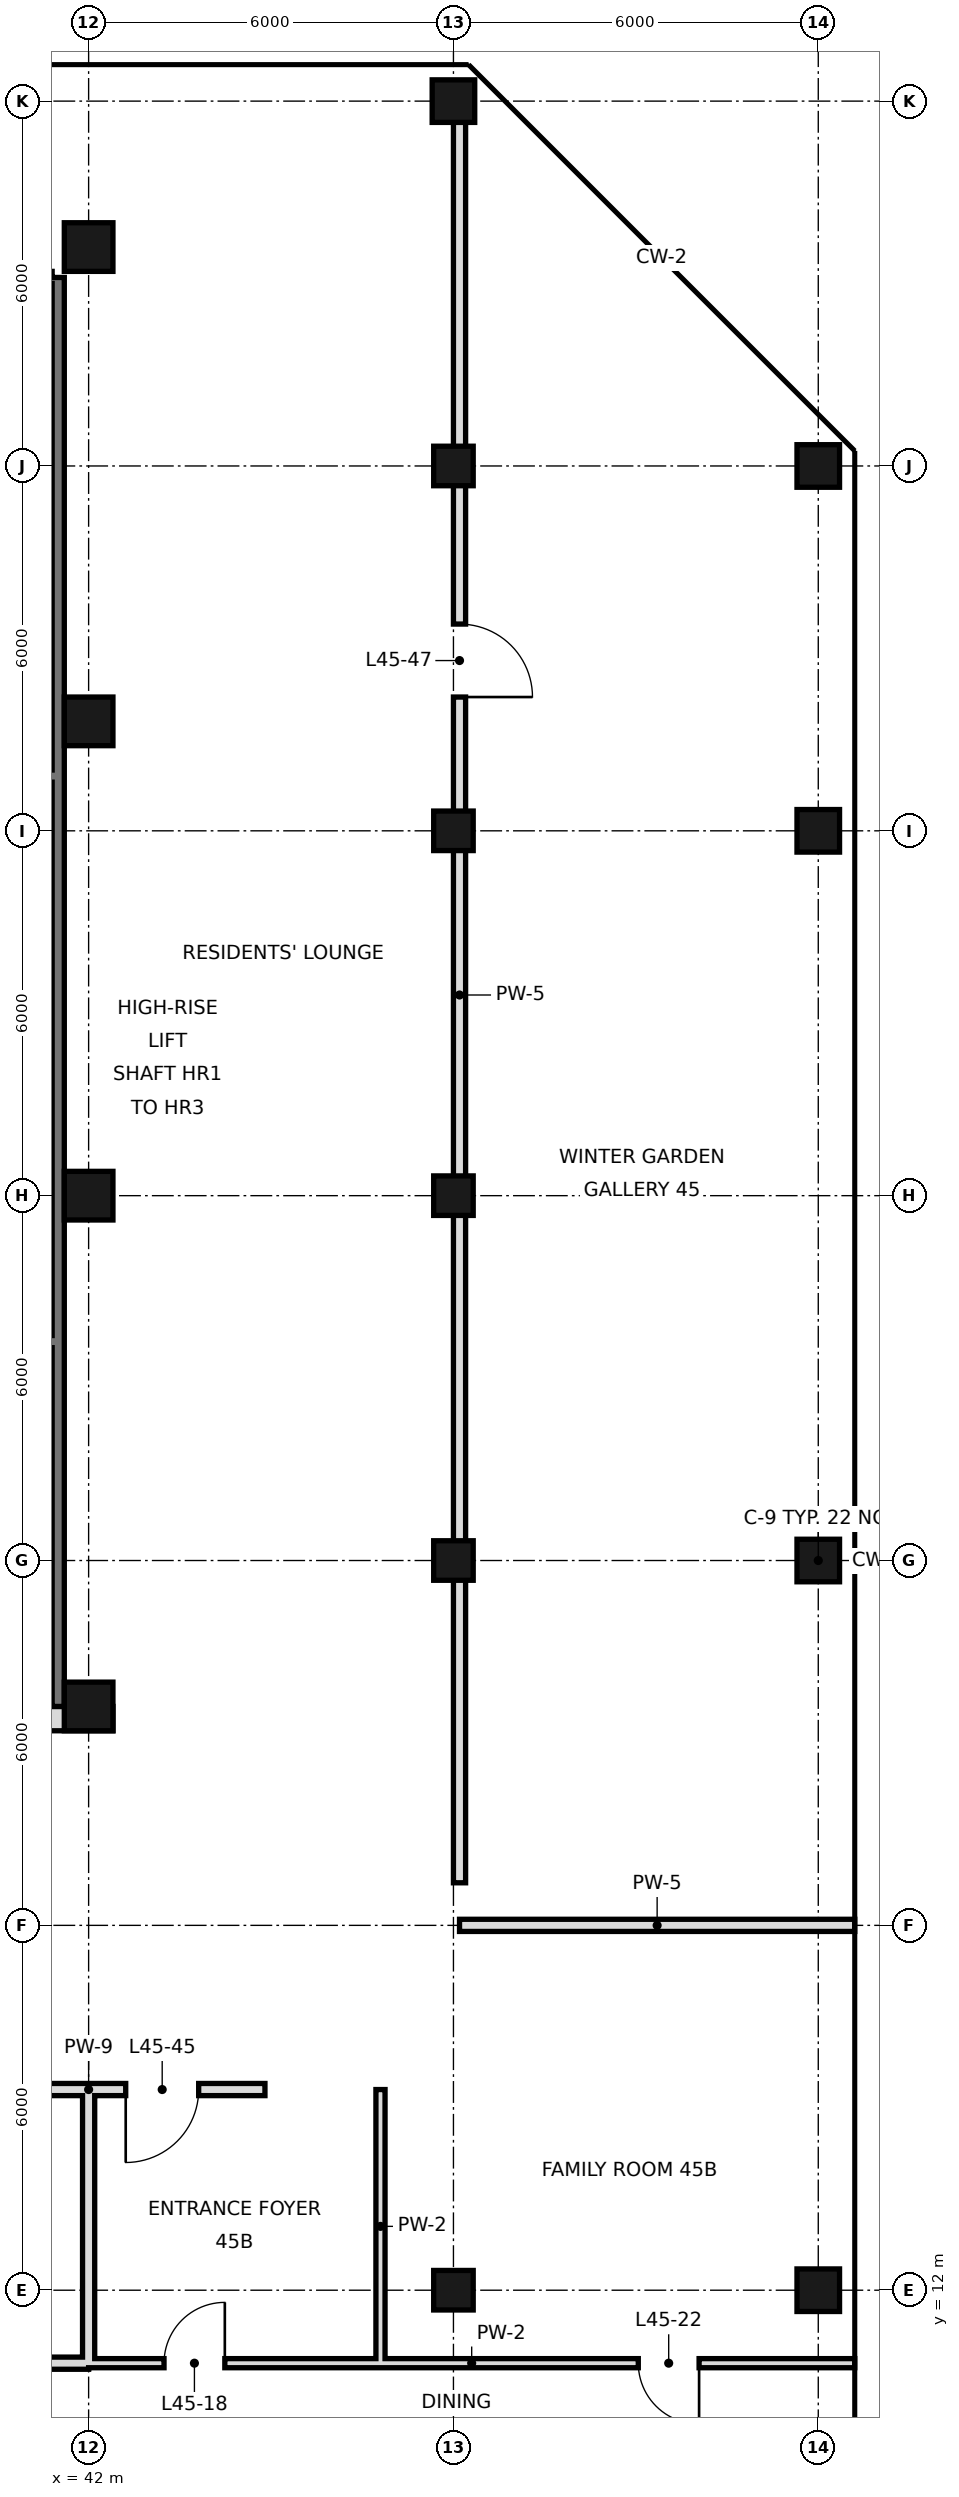
"""IFC4 building model, lengths in metres.
Left out: names, types, materials, properties, quantities, classifications, styles, units other than length and angle.
Written with IfcOpenShell. Run it as: python <this file> out.ifc"""

import sys

from ifc_helpers import new_model, si_unit, direction, frame, frame_2d, origin, origin_2d, place, context, subcontext, project, spatial, rectangle, hollow_rectangle, extrude, element, fill, save


model = new_model("IFC4")
c1 = context("Model", 3, precision=1e-05, world=origin(), true_north=direction((0.0, 1.0)))
c2 = subcontext(c1, "Body", "Model", "MODEL_VIEW")
j1 = project(units=[si_unit("LENGTHUNIT", "METRE"), si_unit("PLANEANGLEUNIT", "RADIAN")], contexts=[c1])
p1 = place(None, origin())
s1 = spatial("IfcSite", under=j1, at=p1, CompositionType="ELEMENT")
p2 = place(p1, origin())
s2 = spatial("IfcBuilding", under=s1, at=p2, CompositionType="ELEMENT")
p3 = place(p2, frame((0.0, 0.0, 195.6)))
s3 = spatial("IfcBuildingStorey", under=s2, at=p3, CompositionType="ELEMENT", Elevation=195.6)
for number, where, z_axis, x_axis in (
    (1, (42.0, 21.6, 0.0), (0.0, 0.0, 1.0), (1.0, 0.0, 0.0)),
    (2, (42.0, 30.0, 0.0), (0.0, 0.0, 1.0), (1.0, 0.0, 0.0)),
    (3, (42.0, 37.8, 0.0), (0.0, 0.0, 1.0), (1.0, 0.0, 0.0)),
    (4, (42.0, 45.6, 0.0), (0.0, 0.0, 1.0), (1.0, 0.0, 0.0)),
):
    element("IfcColumn", number, at=place(p3, frame(where, z_axis=z_axis, x_axis=x_axis)), inside=s3, PredefinedType="COLUMN", context=c2, shape_type="SweptSolid", body=[
        extrude(hollow_rectangle(XDim=0.8, YDim=0.8, WallThickness=0.045, at=origin_2d()), origin(), (0.0, 0.0, 1.0), 3.6),
    ])
for number, where, z_axis, x_axis in (
    (5, (48.0, 12.0, 0.0), (0.0, 0.0, 1.0), (1.0, 0.0, 0.0)),
    (6, (48.0, 24.0, 0.0), (0.0, 0.0, 1.0), (1.0, 0.0, 0.0)),
    (7, (48.0, 30.0, 0.0), (0.0, 0.0, 1.0), (1.0, 0.0, 0.0)),
    (8, (48.0, 36.0, 0.0), (0.0, 0.0, 1.0), (1.0, 0.0, 0.0)),
    (9, (48.0, 42.0, 0.0), (0.0, 0.0, 1.0), (1.0, 0.0, 0.0)),
):
    element("IfcColumn", number, at=place(p3, frame(where, z_axis=z_axis, x_axis=x_axis)), inside=s3, PredefinedType="COLUMN", context=c2, shape_type="SweptSolid", body=[
        extrude(hollow_rectangle(XDim=0.65, YDim=0.65, WallThickness=0.032, at=origin_2d()), origin(), (0.0, 0.0, 1.0), 3.6),
    ])
for number, where, z_axis, x_axis in (
    (10, (48.0, 48.0, 0.0), (0.0, 0.0, 1.0), (1.0, 0.0, 0.0)),
    (11, (54.0, 12.0, 0.0), (0.0, 0.0, 1.0), (1.0, 0.0, 0.0)),
    (12, (54.0, 24.0, 0.0), (0.0, 0.0, 1.0), (1.0, 0.0, 0.0)),
    (13, (54.0, 36.0, 0.0), (0.0, 0.0, 1.0), (1.0, 0.0, 0.0)),
    (14, (54.0, 42.0, 0.0), (0.0, 0.0, 1.0), (1.0, 0.0, 0.0)),
):
    element("IfcColumn", number, at=place(p3, frame(where, z_axis=z_axis, x_axis=x_axis)), inside=s3, PredefinedType="COLUMN", context=c2, shape_type="SweptSolid", body=[
        extrude(hollow_rectangle(XDim=0.7, YDim=0.7, WallThickness=0.036, at=origin_2d()), origin(), (0.0, 0.0, 1.0), 3.6),
    ])
p4 = place(p3, frame((42.0, 10.8, 0.0), z_axis=(0.0, 0.0, 1.0), x_axis=(0.0, 1.0, 0.0)))
e15 = element("IfcWall", 15, at=p4, inside=s3, PredefinedType="SOLIDWALL", context=c2, shape_type="SweptSolid", body=[
    extrude(rectangle(XDim=4.5, YDim=0.2, at=frame_2d((2.25, 0.0))), origin(), (0.0, 0.0, 1.0), 2.72),
])
p5 = place(p3, frame((46.8, 10.8, 0.0), z_axis=(0.0, 0.0, 1.0), x_axis=(0.0, 1.0, 0.0)))
e16 = element("IfcWall", 16, at=p5, inside=s3, PredefinedType="PARTITIONING", context=c2, shape_type="SweptSolid", body=[
    extrude(rectangle(XDim=4.5, YDim=0.15, at=frame_2d((2.25, 0.0))), origin(), (0.0, 0.0, 1.0), 3.42),
])
p6 = place(p3, frame((48.1, 18.7, 0.0), z_axis=(0.0, 0.0, 1.0), x_axis=(0.0, 1.0, 0.0)))
e17 = element("IfcWall", 17, at=p6, inside=s3, PredefinedType="SOLIDWALL", context=c2, shape_type="SweptSolid", body=[
    extrude(rectangle(XDim=29.2, YDim=0.2, at=frame_2d((14.6, 0.0))), origin(), (0.0, 0.0, 1.0), 2.72),
])
p7 = place(p6, frame((19.5, 0.0, 0.0)))
e18 = element("IfcOpeningElement", 18, at=p7, cuts=e17, PredefinedType="OPENING", context=c2, shape_type="SweptSolid", body=[
    extrude(rectangle(XDim=1.2, YDim=2.4, at=frame_2d((0.6, 1.2))), frame((0.0, 0.11, 0.0), z_axis=(0.0, -1.0, 0.0), x_axis=(1.0, 0.0, 0.0)), (0.0, 0.0, 1.0), 0.22),
])
p8 = place(p3, frame((36.6, 10.8, 0.0), z_axis=(0.0, 0.0, 1.0), x_axis=(1.0, 0.0, 0.0)))
e19 = element("IfcWall", 19, at=p8, inside=s3, PredefinedType="SOLIDWALL", context=c2, shape_type="SweptSolid", body=[
    extrude(rectangle(XDim=5.4, YDim=0.2, at=frame_2d((2.7, 0.0))), origin(), (0.0, 0.0, 1.0), 2.72),
])
p9 = place(p8, frame((2.98, 0.0, 0.0)))
e20 = element("IfcOpeningElement", 20, at=p9, cuts=e19, PredefinedType="OPENING", context=c2, shape_type="SweptSolid", body=[
    extrude(rectangle(XDim=1.0, YDim=2.4, at=frame_2d((0.5, 1.2))), frame((0.0, 0.11, 0.0), z_axis=(0.0, -1.0, 0.0), x_axis=(1.0, 0.0, 0.0)), (0.0, 0.0, 1.0), 0.22),
])
p10 = place(p3, frame((42.0, 10.8, 0.0), z_axis=(0.0, 0.0, 1.0), x_axis=(1.0, 0.0, 0.0)))
e21 = element("IfcWall", 21, at=p10, inside=s3, PredefinedType="PARTITIONING", context=c2, shape_type="SweptSolid", body=[
    extrude(rectangle(XDim=12.6, YDim=0.15, at=frame_2d((6.3, 0.0))), origin(), (0.0, 0.0, 1.0), 3.42),
])
p11 = place(p10, frame((1.24, 0.0, 0.0)))
e22 = element("IfcOpeningElement", 22, at=p11, cuts=e21, PredefinedType="OPENING", context=c2, shape_type="SweptSolid", body=[
    extrude(rectangle(XDim=1.0, YDim=2.4, at=frame_2d((0.5, 1.2))), frame((0.0, 0.085, 0.0), z_axis=(0.0, -1.0, 0.0), x_axis=(1.0, 0.0, 0.0)), (0.0, 0.0, 1.0), 0.17),
])
p12 = place(p10, frame((9.04, 0.0, 0.0)))
e23 = element("IfcOpeningElement", 23, at=p12, cuts=e21, PredefinedType="OPENING", context=c2, shape_type="SweptSolid", body=[
    extrude(rectangle(XDim=1.0, YDim=2.4, at=frame_2d((0.5, 1.2))), frame((0.0, 0.085, 0.0), z_axis=(0.0, -1.0, 0.0), x_axis=(1.0, 0.0, 0.0)), (0.0, 0.0, 1.0), 0.17),
])
p13 = place(p3, frame((42.0, 15.3, 0.0), z_axis=(0.0, 0.0, 1.0), x_axis=(1.0, 0.0, 0.0)))
e24 = element("IfcWall", 24, at=p13, inside=s3, PredefinedType="SOLIDWALL", context=c2, shape_type="SweptSolid", body=[
    extrude(rectangle(XDim=2.9, YDim=0.2, at=frame_2d((1.45, 0.0))), origin(), (0.0, 0.0, 1.0), 2.72),
])
p14 = place(p13, frame((0.61, 0.0, 0.0)))
e25 = element("IfcOpeningElement", 25, at=p14, cuts=e24, PredefinedType="OPENING", context=c2, shape_type="SweptSolid", body=[
    extrude(rectangle(XDim=1.2, YDim=2.4, at=frame_2d((0.6, 1.2))), frame((0.0, 0.11, 0.0), z_axis=(0.0, -1.0, 0.0), x_axis=(1.0, 0.0, 0.0)), (0.0, 0.0, 1.0), 0.22),
])
p15 = place(p3, frame((36.6, 15.3, 0.0), z_axis=(0.0, 0.0, 1.0), x_axis=(1.0, 0.0, 0.0)))
e26 = element("IfcWall", 26, at=p15, inside=s3, PredefinedType="SOLIDWALL", context=c2, shape_type="SweptSolid", body=[
    extrude(rectangle(XDim=5.4, YDim=0.2, at=frame_2d((2.7, 0.0))), origin(), (0.0, 0.0, 1.0), 2.72),
])
p16 = place(p3, frame((48.1, 18.0, 0.0), z_axis=(0.0, 0.0, 1.0), x_axis=(1.0, 0.0, 0.0)))
e27 = element("IfcWall", 27, at=p16, inside=s3, PredefinedType="SOLIDWALL", context=c2, shape_type="SweptSolid", body=[
    extrude(rectangle(XDim=6.5, YDim=0.2, at=frame_2d((3.25, 0.0))), origin(), (0.0, 0.0, 1.0), 2.72),
])
p17 = place(p3, frame((41.5, 21.6, 0.0), z_axis=(0.0, 0.0, 1.0), x_axis=(0.0, 1.0, 0.0)))
e28 = element("IfcWall", 28, at=p17, inside=s3, PredefinedType="SOLIDWALL", context=c2, shape_type="SweptSolid", body=[
    extrude(rectangle(XDim=23.5, YDim=0.2, at=frame_2d((11.75, 0.0))), origin(), (0.0, 0.0, 1.0), 3.42),
])
p18 = place(p3, frame((5.6, 21.4, 0.0), z_axis=(0.0, 0.0, 1.0), x_axis=(1.0, 0.0, 0.0)))
e29 = element("IfcWall", 29, at=p18, inside=s3, PredefinedType="SOLIDWALL", context=c2, shape_type="SweptSolid", body=[
    extrude(rectangle(XDim=36.8, YDim=0.4, at=frame_2d((18.4, 0.0))), origin(), (0.0, 0.0, 1.0), 3.42),
])
p19 = place(p18, frame((8.5, 0.0, 0.0)))
e30 = element("IfcOpeningElement", 30, at=p19, cuts=e29, PredefinedType="OPENING", context=c2, shape_type="SweptSolid", body=[
    extrude(rectangle(XDim=1.8, YDim=2.1, at=frame_2d((0.9, 1.05))), frame((0.0, 0.21, 0.0), z_axis=(0.0, -1.0, 0.0), x_axis=(1.0, 0.0, 0.0)), (0.0, 0.0, 1.0), 0.42),
])
p20 = place(p18, frame((17.5, 0.0, 0.0)))
e31 = element("IfcOpeningElement", 31, at=p20, cuts=e29, PredefinedType="OPENING", context=c2, shape_type="SweptSolid", body=[
    extrude(rectangle(XDim=1.8, YDim=2.1, at=frame_2d((0.9, 1.05))), frame((0.0, 0.21, 0.0), z_axis=(0.0, -1.0, 0.0), x_axis=(1.0, 0.0, 0.0)), (0.0, 0.0, 1.0), 0.42),
])
p21 = place(p18, frame((26.5, 0.0, 0.0)))
e32 = element("IfcOpeningElement", 32, at=p21, cuts=e29, PredefinedType="OPENING", context=c2, shape_type="SweptSolid", body=[
    extrude(rectangle(XDim=1.8, YDim=2.1, at=frame_2d((0.9, 1.05))), frame((0.0, 0.21, 0.0), z_axis=(0.0, -1.0, 0.0), x_axis=(1.0, 0.0, 0.0)), (0.0, 0.0, 1.0), 0.42),
])
p22 = place(p18, frame((4.5, 0.0, 0.0)))
e33 = element("IfcOpeningElement", 33, at=p22, cuts=e29, PredefinedType="OPENING", context=c2, shape_type="SweptSolid", body=[
    extrude(rectangle(XDim=1.2, YDim=2.1, at=frame_2d((0.6, 1.05))), frame((0.0, 0.21, 0.0), z_axis=(0.0, -1.0, 0.0), x_axis=(1.0, 0.0, 0.0)), (0.0, 0.0, 1.0), 0.42),
])
p23 = place(p18, frame((31.1, 0.0, 0.0)))
e34 = element("IfcOpeningElement", 34, at=p23, cuts=e29, PredefinedType="OPENING", context=c2, shape_type="SweptSolid", body=[
    extrude(rectangle(XDim=1.2, YDim=2.1, at=frame_2d((0.6, 1.05))), frame((0.0, 0.21, 0.0), z_axis=(0.0, -1.0, 0.0), x_axis=(1.0, 0.0, 0.0)), (0.0, 0.0, 1.0), 0.42),
])
p24 = place(p3, frame((38.7, 36.9, 0.0), z_axis=(0.0, 0.0, 1.0), x_axis=(1.0, 0.0, 0.0)))
e35 = element("IfcWall", 35, at=p24, inside=s3, PredefinedType="SOLIDWALL", context=c2, shape_type="SweptSolid", body=[
    extrude(rectangle(XDim=2.7, YDim=0.2, at=frame_2d((1.35, 0.0))), origin(), (0.0, 0.0, 1.0), 3.42),
])
p25 = place(p11, frame((1.0, 0.0, 0.0), z_axis=(0.0, 0.0, 1.0), x_axis=(-1.0, 0.0, 0.0)))
e36 = element("IfcDoor", 36, at=p25, inside=s3, OperationType="SINGLE_SWING_LEFT", PredefinedType="DOOR", context=c2, shape_type="SweptSolid", body=[
    extrude(rectangle(XDim=1.0, YDim=2.4, at=frame_2d((0.5, 1.2))), frame((0.0, 0.025, 0.0), z_axis=(0.0, -1.0, 0.0), x_axis=(1.0, 0.0, 0.0)), (0.0, 0.0, 1.0), 0.05),
])
fill(e22, e36)
p26 = place(p12, origin())
e37 = element("IfcDoor", 37, at=p26, inside=s3, OperationType="SINGLE_SWING_RIGHT", PredefinedType="DOOR", context=c2, shape_type="SweptSolid", body=[
    extrude(rectangle(XDim=1.0, YDim=2.4, at=frame_2d((0.5, 1.2))), frame((0.0, 0.025, 0.0), z_axis=(0.0, -1.0, 0.0), x_axis=(1.0, 0.0, 0.0)), (0.0, 0.0, 1.0), 0.05),
])
fill(e23, e37)
p27 = place(p14, frame((1.2, 0.0, 0.0), z_axis=(0.0, 0.0, 1.0), x_axis=(-1.0, 0.0, 0.0)))
e38 = element("IfcDoor", 38, at=p27, inside=s3, OperationType="SINGLE_SWING_RIGHT", PredefinedType="DOOR", context=c2, shape_type="SweptSolid", body=[
    extrude(rectangle(XDim=1.2, YDim=2.4, at=frame_2d((0.6, 1.2))), frame((0.0, 0.025, 0.0), z_axis=(0.0, -1.0, 0.0), x_axis=(1.0, 0.0, 0.0)), (0.0, 0.0, 1.0), 0.05),
])
fill(e25, e38)
p28 = place(p7, frame((1.2, 0.0, 0.0), z_axis=(0.0, 0.0, 1.0), x_axis=(-1.0, 0.0, 0.0)))
e39 = element("IfcDoor", 39, at=p28, inside=s3, OperationType="SINGLE_SWING_RIGHT", PredefinedType="DOOR", context=c2, shape_type="SweptSolid", body=[
    extrude(rectangle(XDim=1.2, YDim=2.4, at=frame_2d((0.6, 1.2))), frame((0.0, 0.025, 0.0), z_axis=(0.0, -1.0, 0.0), x_axis=(1.0, 0.0, 0.0)), (0.0, 0.0, 1.0), 0.05),
])
fill(e18, e39)
save(model, sys.argv[1])
